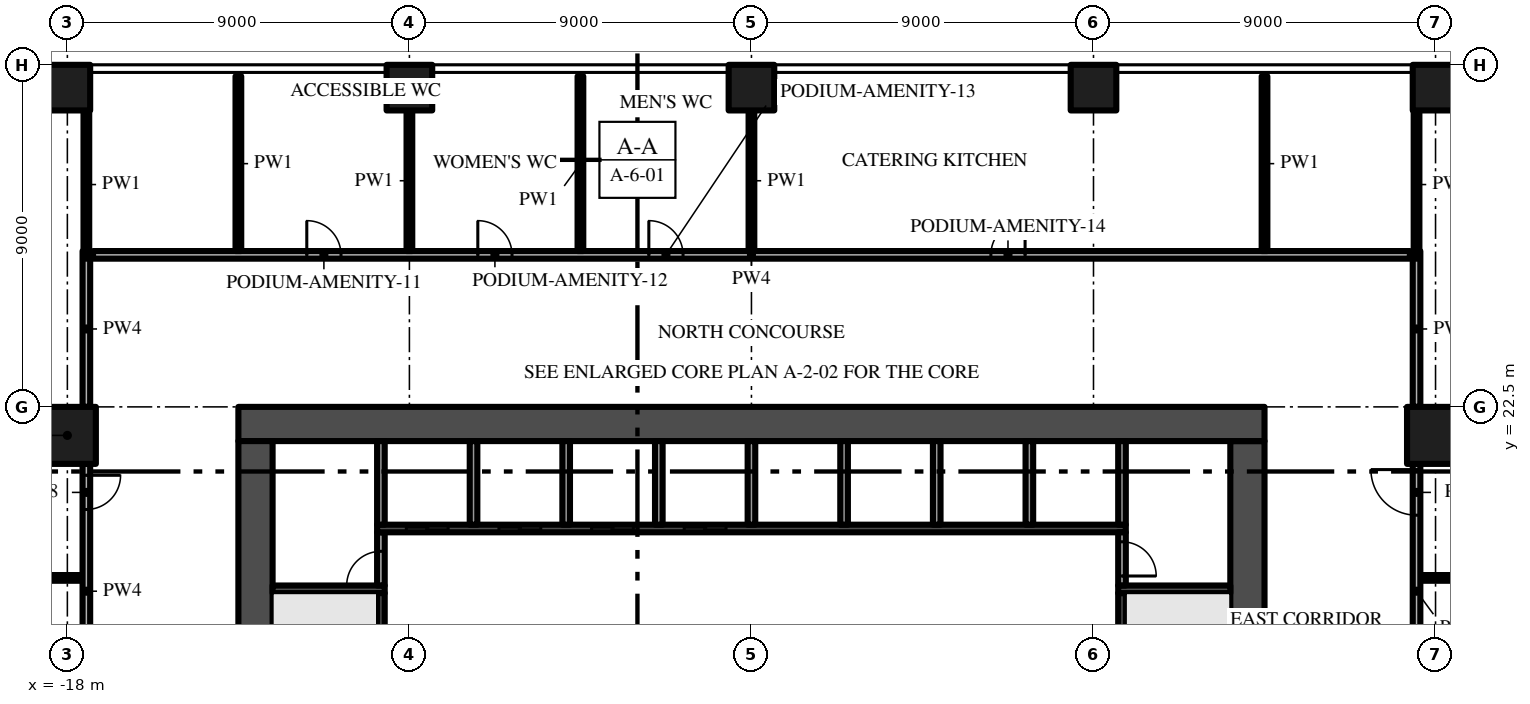
"""IFC4 building model, lengths in metres.
Left out: names, types, materials, properties, quantities, classifications, styles, units other than length and angle.
Written with IfcOpenShell. Run it as: python <this file> out.ifc"""

import sys

from ifc_helpers import new_model, si_unit, direction, frame, frame_2d, origin, origin_2d, place, context, subcontext, project, spatial, rectangle, extrude, element, fill, save


model = new_model("IFC4")
c1 = context("Model", 3, precision=1e-05, world=origin(), true_north=direction((0.0, 1.0)))
c2 = subcontext(c1, "Body", "Model", "MODEL_VIEW")
j1 = project(units=[si_unit("LENGTHUNIT", "METRE"), si_unit("PLANEANGLEUNIT", "RADIAN")], contexts=[c1])
p1 = place(None, origin())
s1 = spatial("IfcSite", under=j1, at=p1, CompositionType="ELEMENT")
p2 = place(p1, origin())
s2 = spatial("IfcBuilding", under=s1, at=p2, CompositionType="ELEMENT")
p3 = place(p2, frame((0.0, 0.0, 6.0)))
s3 = spatial("IfcBuildingStorey", under=s2, at=p3, CompositionType="ELEMENT", Elevation=6.0)
p4 = place(p3, frame((13.05, 5.4, -0.4), z_axis=(0.0, 0.0, 1.0), x_axis=(0.0, 1.0, 0.0)))
e1 = element("IfcWall", 1, at=p4, inside=s3, PredefinedType="SHEAR", context=c2, shape_type="SweptSolid", body=[
    extrude(rectangle(XDim=16.2, YDim=0.9, at=frame_2d((8.1, 0.0))), origin(), (0.0, 0.0, 1.0), 4.55),
])
p5 = place(p4, frame((6.0, 0.0, 0.4)))
e2 = element("IfcOpeningElement", 2, at=p5, cuts=e1, PredefinedType="OPENING", context=c2, shape_type="SweptSolid", body=[
    extrude(rectangle(XDim=1.2, YDim=2.2, at=frame_2d((0.6, 1.1))), frame((0.0, 0.46, 0.0), z_axis=(0.0, -1.0, 0.0), x_axis=(1.0, 0.0, 0.0)), (0.0, 0.0, 1.0), 0.92),
])
p6 = place(p3, frame((13.5, 22.05, -0.4), z_axis=(0.0, 0.0, 1.0), x_axis=(-1.0, 0.0, 0.0)))
e3 = element("IfcWall", 3, at=p6, inside=s3, PredefinedType="SHEAR", context=c2, shape_type="SweptSolid", body=[
    extrude(rectangle(XDim=27.0, YDim=0.9, at=frame_2d((13.5, 0.0))), origin(), (0.0, 0.0, 1.0), 4.55),
])
p7 = place(p3, frame((-13.05, 21.6, -0.4), z_axis=(0.0, 0.0, 1.0), x_axis=(0.0, -1.0, 0.0)))
e4 = element("IfcWall", 4, at=p7, inside=s3, PredefinedType="SHEAR", context=c2, shape_type="SweptSolid", body=[
    extrude(rectangle(XDim=16.2, YDim=0.9, at=frame_2d((8.1, 0.0))), origin(), (0.0, 0.0, 1.0), 4.55),
])
p8 = place(p7, frame((9.0, 0.0, 0.4)))
e5 = element("IfcOpeningElement", 5, at=p8, cuts=e4, PredefinedType="OPENING", context=c2, shape_type="SweptSolid", body=[
    extrude(rectangle(XDim=1.2, YDim=2.2, at=frame_2d((0.6, 1.1))), frame((0.0, 0.46, 0.0), z_axis=(0.0, -1.0, 0.0), x_axis=(1.0, 0.0, 0.0)), (0.0, 0.0, 1.0), 0.92),
])
for number, where, z_axis, x_axis in (
    (6, (-18.0, 30.9, 0.0), (0.0, 0.0, 1.0), (1.0, 0.0, 0.0)),
    (7, (-9.0, 30.9, 0.0), (0.0, 0.0, 1.0), (1.0, 0.0, 0.0)),
    (8, (0.0, 30.9, 0.0), (0.0, 0.0, 1.0), (1.0, 0.0, 0.0)),
    (9, (18.0, 30.9, 0.0), (0.0, 0.0, 1.0), (1.0, 0.0, 0.0)),
    (10, (9.0, 30.9, 0.0), (0.0, 0.0, 1.0), (1.0, 0.0, 0.0)),
):
    element("IfcColumn", number, at=place(p3, frame(where, z_axis=z_axis, x_axis=x_axis)), inside=s3, PredefinedType="COLUMN", context=c2, shape_type="SweptSolid", body=[
        extrude(rectangle(XDim=1.2, YDim=1.2, at=origin_2d()), origin(), (0.0, 0.0, 1.0), 4.15),
    ])
for number, where, z_axis, x_axis in (
    (11, (-18.0, 21.75, 0.0), (0.0, 0.0, 1.0), (1.0, 0.0, 0.0)),
    (12, (18.0, 21.75, 0.0), (0.0, 0.0, 1.0), (1.0, 0.0, 0.0)),
):
    element("IfcColumn", number, at=place(p3, frame(where, z_axis=z_axis, x_axis=x_axis)), inside=s3, PredefinedType="COLUMN", context=c2, shape_type="SweptSolid", body=[
        extrude(rectangle(XDim=1.5, YDim=1.5, at=origin_2d()), origin(), (0.0, 0.0, 1.0), 4.15),
    ])
p9 = place(p3, frame((-12.6, 17.7, 0.0), z_axis=(0.0, 0.0, 1.0), x_axis=(1.0, 0.0, 0.0)))
e13 = element("IfcWall", 13, at=p9, inside=s3, PredefinedType="SHEAR", context=c2, shape_type="SweptSolid", body=[
    extrude(rectangle(XDim=2.95, YDim=0.2, at=frame_2d((1.475, 0.0))), origin(), (0.0, 0.0, 1.0), 4.15),
])
p10 = place(p3, frame((-9.75, 16.1, 0.0), z_axis=(0.0, 0.0, 1.0), x_axis=(0.0, 1.0, 0.0)))
e14 = element("IfcWall", 14, at=p10, inside=s3, PredefinedType="SHEAR", context=c2, shape_type="SweptSolid", body=[
    extrude(rectangle(XDim=1.5, YDim=0.2, at=frame_2d((0.75, 0.0))), origin(), (0.0, 0.0, 1.0), 4.15),
])
p11 = place(p3, frame((-9.75, 17.8, 0.0), z_axis=(0.0, 0.0, 1.0), x_axis=(0.0, 1.0, 0.0)))
e15 = element("IfcWall", 15, at=p11, inside=s3, PredefinedType="PARTITIONING", context=c2, shape_type="SweptSolid", body=[
    extrude(rectangle(XDim=1.4, YDim=0.2, at=frame_2d((0.7, 0.0))), origin(), (0.0, 0.0, 1.0), 4.15),
])
p12 = place(p11, origin())
e16 = element("IfcOpeningElement", 16, at=p12, cuts=e15, PredefinedType="OPENING", context=c2, shape_type="SweptSolid", body=[
    extrude(rectangle(XDim=0.9, YDim=2.1, at=frame_2d((0.45, 1.05))), frame((0.0, 0.11, 0.0), z_axis=(0.0, -1.0, 0.0), x_axis=(1.0, 0.0, 0.0)), (0.0, 0.0, 1.0), 0.22),
])
p13 = place(p3, frame((-9.85, 19.3, 0.0), z_axis=(0.0, 0.0, 1.0), x_axis=(1.0, 0.0, 0.0)))
e17 = element("IfcWall", 17, at=p13, inside=s3, PredefinedType="SHEAR", context=c2, shape_type="SweptSolid", body=[
    extrude(rectangle(XDim=19.7, YDim=0.2, at=frame_2d((9.85, 0.0))), origin(), (0.0, 0.0, 1.0), 4.15),
])
p14 = place(p13, frame((0.769, 0.0, 0.0)))
e18 = element("IfcOpeningElement", 18, at=p14, cuts=e17, PredefinedType="OPENING", context=c2, shape_type="SweptSolid", body=[
    extrude(rectangle(XDim=1.1, YDim=2.1, at=frame_2d((0.55, 1.05))), frame((0.0, 0.11, 0.0), z_axis=(0.0, -1.0, 0.0), x_axis=(1.0, 0.0, 0.0)), (0.0, 0.0, 1.0), 0.22),
])
p15 = place(p13, frame((3.206, 0.0, 0.0)))
e19 = element("IfcOpeningElement", 19, at=p15, cuts=e17, PredefinedType="OPENING", context=c2, shape_type="SweptSolid", body=[
    extrude(rectangle(XDim=1.1, YDim=2.1, at=frame_2d((0.55, 1.05))), frame((0.0, 0.11, 0.0), z_axis=(0.0, -1.0, 0.0), x_axis=(1.0, 0.0, 0.0)), (0.0, 0.0, 1.0), 0.22),
])
p16 = place(p13, frame((5.644, 0.0, 0.0)))
e20 = element("IfcOpeningElement", 20, at=p16, cuts=e17, PredefinedType="OPENING", context=c2, shape_type="SweptSolid", body=[
    extrude(rectangle(XDim=1.1, YDim=2.1, at=frame_2d((0.55, 1.05))), frame((0.0, 0.11, 0.0), z_axis=(0.0, -1.0, 0.0), x_axis=(1.0, 0.0, 0.0)), (0.0, 0.0, 1.0), 0.22),
])
p17 = place(p13, frame((8.081, 0.0, 0.0)))
e21 = element("IfcOpeningElement", 21, at=p17, cuts=e17, PredefinedType="OPENING", context=c2, shape_type="SweptSolid", body=[
    extrude(rectangle(XDim=1.1, YDim=2.1, at=frame_2d((0.55, 1.05))), frame((0.0, 0.11, 0.0), z_axis=(0.0, -1.0, 0.0), x_axis=(1.0, 0.0, 0.0)), (0.0, 0.0, 1.0), 0.22),
])
for number, where, z_axis, x_axis in (
    (22, (-9.75, 19.4, 0.0), (0.0, 0.0, 1.0), (0.0, 1.0, 0.0)),
    (23, (-7.312, 19.4, 0.0), (0.0, 0.0, 1.0), (0.0, 1.0, 0.0)),
    (24, (-4.875, 19.4, 0.0), (0.0, 0.0, 1.0), (0.0, 1.0, 0.0)),
    (25, (-2.438, 19.4, 0.0), (0.0, 0.0, 1.0), (0.0, 1.0, 0.0)),
    (26, (0.0, 19.4, 0.0), (0.0, 0.0, 1.0), (0.0, 1.0, 0.0)),
    (27, (2.438, 19.4, 0.0), (0.0, 0.0, 1.0), (0.0, 1.0, 0.0)),
    (28, (4.875, 19.4, 0.0), (0.0, 0.0, 1.0), (0.0, 1.0, 0.0)),
    (29, (7.312, 19.4, 0.0), (0.0, 0.0, 1.0), (0.0, 1.0, 0.0)),
):
    element("IfcWall", number, at=place(p3, frame(where, z_axis=z_axis, x_axis=x_axis)), inside=s3, PredefinedType="PARTITIONING", context=c2, shape_type="SweptSolid", body=[
        extrude(rectangle(XDim=2.2, YDim=0.2, at=frame_2d((1.1, 0.0))), origin(), (0.0, 0.0, 1.0), 4.15),
    ])
p18 = place(p3, frame((9.75, 16.1, 0.0), z_axis=(0.0, 0.0, 1.0), x_axis=(0.0, 1.0, 0.0)))
e30 = element("IfcWall", 30, at=p18, inside=s3, PredefinedType="SHEAR", context=c2, shape_type="SweptSolid", body=[
    extrude(rectangle(XDim=1.5, YDim=0.2, at=frame_2d((0.75, 0.0))), origin(), (0.0, 0.0, 1.0), 4.15),
])
p19 = place(p3, frame((9.65, 17.7, 0.0), z_axis=(0.0, 0.0, 1.0), x_axis=(1.0, 0.0, 0.0)))
e31 = element("IfcWall", 31, at=p19, inside=s3, PredefinedType="SHEAR", context=c2, shape_type="SweptSolid", body=[
    extrude(rectangle(XDim=2.95, YDim=0.2, at=frame_2d((1.475, 0.0))), origin(), (0.0, 0.0, 1.0), 4.15),
])
p20 = place(p3, frame((9.75, 19.2, 0.0), z_axis=(0.0, 0.0, 1.0), x_axis=(0.0, -1.0, 0.0)))
e32 = element("IfcWall", 32, at=p20, inside=s3, PredefinedType="PARTITIONING", context=c2, shape_type="SweptSolid", body=[
    extrude(rectangle(XDim=1.4, YDim=0.2, at=frame_2d((0.7, 0.0))), origin(), (0.0, 0.0, 1.0), 4.15),
])
p21 = place(p20, frame((0.25, 0.0, 0.0)))
e33 = element("IfcOpeningElement", 33, at=p21, cuts=e32, PredefinedType="OPENING", context=c2, shape_type="SweptSolid", body=[
    extrude(rectangle(XDim=0.9, YDim=2.1, at=frame_2d((0.45, 1.05))), frame((0.0, 0.11, 0.0), z_axis=(0.0, -1.0, 0.0), x_axis=(1.0, 0.0, 0.0)), (0.0, 0.0, 1.0), 0.22),
])
p22 = place(p3, frame((9.75, 19.4, 0.0), z_axis=(0.0, 0.0, 1.0), x_axis=(0.0, 1.0, 0.0)))
e34 = element("IfcWall", 34, at=p22, inside=s3, PredefinedType="PARTITIONING", context=c2, shape_type="SweptSolid", body=[
    extrude(rectangle(XDim=2.2, YDim=0.2, at=frame_2d((1.1, 0.0))), origin(), (0.0, 0.0, 1.0), 4.15),
])
for number, where, z_axis, x_axis in (
    (35, (-21.75, 18.0, 0.0), (0.0, 0.0, 1.0), (1.0, 0.0, 0.0)),
    (36, (17.6, 18.0, 0.0), (0.0, 0.0, 1.0), (1.0, 0.0, 0.0)),
):
    element("IfcWall", number, at=place(p3, frame(where, z_axis=z_axis, x_axis=x_axis)), inside=s3, PredefinedType="PARTITIONING", context=c2, shape_type="SweptSolid", body=[
        extrude(rectangle(XDim=4.15, YDim=0.15, at=frame_2d((2.075, 0.0))), origin(), (0.0, 0.0, 1.0), 4.15),
    ])
p23 = place(p3, frame((-17.325, 26.5, 0.0), z_axis=(0.0, 0.0, 1.0), x_axis=(1.0, 0.0, 0.0)))
e37 = element("IfcWall", 37, at=p23, inside=s3, PredefinedType="PARTITIONING", context=c2, shape_type="SweptSolid", body=[
    extrude(rectangle(XDim=34.65, YDim=0.2, at=frame_2d((17.325, 0.0))), origin(), (0.0, 0.0, 1.0), 4.15),
])
p24 = place(p23, frame((5.625, 0.0, 0.0)))
e38 = element("IfcOpeningElement", 38, at=p24, cuts=e37, PredefinedType="OPENING", context=c2, shape_type="SweptSolid", body=[
    extrude(rectangle(XDim=0.9, YDim=2.1, at=frame_2d((0.45, 1.05))), frame((0.0, 0.11, 0.0), z_axis=(0.0, -1.0, 0.0), x_axis=(1.0, 0.0, 0.0)), (0.0, 0.0, 1.0), 0.22),
])
p25 = place(p23, frame((10.125, 0.0, 0.0)))
e39 = element("IfcOpeningElement", 39, at=p25, cuts=e37, PredefinedType="OPENING", context=c2, shape_type="SweptSolid", body=[
    extrude(rectangle(XDim=0.9, YDim=2.1, at=frame_2d((0.45, 1.05))), frame((0.0, 0.11, 0.0), z_axis=(0.0, -1.0, 0.0), x_axis=(1.0, 0.0, 0.0)), (0.0, 0.0, 1.0), 0.22),
])
p26 = place(p23, frame((14.625, 0.0, 0.0)))
e40 = element("IfcOpeningElement", 40, at=p26, cuts=e37, PredefinedType="OPENING", context=c2, shape_type="SweptSolid", body=[
    extrude(rectangle(XDim=0.9, YDim=2.1, at=frame_2d((0.45, 1.05))), frame((0.0, 0.11, 0.0), z_axis=(0.0, -1.0, 0.0), x_axis=(1.0, 0.0, 0.0)), (0.0, 0.0, 1.0), 0.22),
])
p27 = place(p23, frame((23.625, 0.0, 0.0)))
e41 = element("IfcOpeningElement", 41, at=p27, cuts=e37, PredefinedType="OPENING", context=c2, shape_type="SweptSolid", body=[
    extrude(rectangle(XDim=0.9, YDim=2.1, at=frame_2d((0.45, 1.05))), frame((0.0, 0.11, 0.0), z_axis=(0.0, -1.0, 0.0), x_axis=(1.0, 0.0, 0.0)), (0.0, 0.0, 1.0), 0.22),
])
p28 = place(p3, frame((-17.5, 21.0, 0.0), z_axis=(0.0, 0.0, 1.0), x_axis=(0.0, -1.0, 0.0)))
e42 = element("IfcWall", 42, at=p28, inside=s3, PredefinedType="PARTITIONING", context=c2, shape_type="SweptSolid", body=[
    extrude(rectangle(XDim=6.7, YDim=0.2, at=frame_2d((3.35, 0.0))), origin(), (0.0, 0.0, 1.0), 4.15),
])
p29 = place(p28, frame((0.3, 0.0, 0.0)))
e43 = element("IfcOpeningElement", 43, at=p29, cuts=e42, PredefinedType="OPENING", context=c2, shape_type="SweptSolid", body=[
    extrude(rectangle(XDim=0.9, YDim=2.1, at=frame_2d((0.45, 1.05))), frame((0.0, 0.11, 0.0), z_axis=(0.0, -1.0, 0.0), x_axis=(1.0, 0.0, 0.0)), (0.0, 0.0, 1.0), 0.22),
])
p30 = place(p3, frame((-17.5, 22.5, 0.0), z_axis=(0.0, 0.0, 1.0), x_axis=(0.0, 1.0, 0.0)))
e44 = element("IfcWall", 44, at=p30, inside=s3, PredefinedType="PARTITIONING", context=c2, shape_type="SweptSolid", body=[
    extrude(rectangle(XDim=4.1, YDim=0.2, at=frame_2d((2.05, 0.0))), origin(), (0.0, 0.0, 1.0), 4.15),
])
p31 = place(p3, frame((-17.5, 26.4, 0.0), z_axis=(0.0, 0.0, 1.0), x_axis=(0.0, 1.0, 0.0)))
e45 = element("IfcWall", 45, at=p31, inside=s3, PredefinedType="PARTITIONING", context=c2, shape_type="SweptSolid", body=[
    extrude(rectangle(XDim=3.9, YDim=0.15, at=frame_2d((1.95, 0.0))), origin(), (0.0, 0.0, 1.0), 4.15),
])
p32 = place(p3, frame((-13.5, 26.6, 0.0), z_axis=(0.0, 0.0, 1.0), x_axis=(0.0, 1.0, 0.0)))
e46 = element("IfcWall", 46, at=p32, inside=s3, PredefinedType="PARTITIONING", context=c2, shape_type="SweptSolid", body=[
    extrude(rectangle(XDim=4.6, YDim=0.15, at=frame_2d((2.3, 0.0))), origin(), (0.0, 0.0, 1.0), 4.15),
])
p33 = place(p3, frame((-9.0, 26.6, 0.0), z_axis=(0.0, 0.0, 1.0), x_axis=(0.0, 1.0, 0.0)))
e47 = element("IfcWall", 47, at=p33, inside=s3, PredefinedType="PARTITIONING", context=c2, shape_type="SweptSolid", body=[
    extrude(rectangle(XDim=3.7, YDim=0.15, at=frame_2d((1.85, 0.0))), origin(), (0.0, 0.0, 1.0), 4.15),
])
p34 = place(p3, frame((-4.5, 26.6, 0.0), z_axis=(0.0, 0.0, 1.0), x_axis=(0.0, 1.0, 0.0)))
e48 = element("IfcWall", 48, at=p34, inside=s3, PredefinedType="PARTITIONING", context=c2, shape_type="SweptSolid", body=[
    extrude(rectangle(XDim=4.6, YDim=0.15, at=frame_2d((2.3, 0.0))), origin(), (0.0, 0.0, 1.0), 4.15),
])
p35 = place(p3, frame((0.0, 26.6, 0.0), z_axis=(0.0, 0.0, 1.0), x_axis=(0.0, 1.0, 0.0)))
e49 = element("IfcWall", 49, at=p35, inside=s3, PredefinedType="PARTITIONING", context=c2, shape_type="SweptSolid", body=[
    extrude(rectangle(XDim=3.7, YDim=0.15, at=frame_2d((1.85, 0.0))), origin(), (0.0, 0.0, 1.0), 4.15),
])
p36 = place(p3, frame((13.5, 26.6, 0.0), z_axis=(0.0, 0.0, 1.0), x_axis=(0.0, 1.0, 0.0)))
e50 = element("IfcWall", 50, at=p36, inside=s3, PredefinedType="PARTITIONING", context=c2, shape_type="SweptSolid", body=[
    extrude(rectangle(XDim=4.6, YDim=0.15, at=frame_2d((2.3, 0.0))), origin(), (0.0, 0.0, 1.0), 4.15),
])
p37 = place(p3, frame((17.5, 14.3, 0.0), z_axis=(0.0, 0.0, 1.0), x_axis=(0.0, 1.0, 0.0)))
e51 = element("IfcWall", 51, at=p37, inside=s3, PredefinedType="PARTITIONING", context=c2, shape_type="SweptSolid", body=[
    extrude(rectangle(XDim=6.7, YDim=0.2, at=frame_2d((3.35, 0.0))), origin(), (0.0, 0.0, 1.0), 4.15),
])
p38 = place(p37, frame((5.35, 0.0, 0.0)))
e52 = element("IfcOpeningElement", 52, at=p38, cuts=e51, PredefinedType="OPENING", context=c2, shape_type="SweptSolid", body=[
    extrude(rectangle(XDim=1.2, YDim=2.4, at=frame_2d((0.6, 1.2))), frame((0.0, 0.11, 0.0), z_axis=(0.0, -1.0, 0.0), x_axis=(1.0, 0.0, 0.0)), (0.0, 0.0, 1.0), 0.22),
])
p39 = place(p3, frame((17.5, 22.5, 0.0), z_axis=(0.0, 0.0, 1.0), x_axis=(0.0, 1.0, 0.0)))
e53 = element("IfcWall", 53, at=p39, inside=s3, PredefinedType="PARTITIONING", context=c2, shape_type="SweptSolid", body=[
    extrude(rectangle(XDim=4.1, YDim=0.2, at=frame_2d((2.05, 0.0))), origin(), (0.0, 0.0, 1.0), 4.15),
])
p40 = place(p3, frame((17.5, 26.4, 0.0), z_axis=(0.0, 0.0, 1.0), x_axis=(0.0, 1.0, 0.0)))
e54 = element("IfcWall", 54, at=p40, inside=s3, PredefinedType="PARTITIONING", context=c2, shape_type="SweptSolid", body=[
    extrude(rectangle(XDim=3.9, YDim=0.15, at=frame_2d((1.95, 0.0))), origin(), (0.0, 0.0, 1.0), 4.15),
])
p41 = place(p14, origin())
e55 = element("IfcDoor", 55, at=p41, inside=s3, OperationType="SLIDING_TO_LEFT", PredefinedType="DOOR", context=c2, shape_type="SweptSolid", body=[
    extrude(rectangle(XDim=1.1, YDim=2.1, at=frame_2d((0.55, 1.05))), frame((0.0, 0.025, 0.0), z_axis=(0.0, -1.0, 0.0), x_axis=(1.0, 0.0, 0.0)), (0.0, 0.0, 1.0), 0.05),
])
fill(e18, e55)
p42 = place(p15, origin())
e56 = element("IfcDoor", 56, at=p42, inside=s3, OperationType="SLIDING_TO_LEFT", PredefinedType="DOOR", context=c2, shape_type="SweptSolid", body=[
    extrude(rectangle(XDim=1.1, YDim=2.1, at=frame_2d((0.55, 1.05))), frame((0.0, 0.025, 0.0), z_axis=(0.0, -1.0, 0.0), x_axis=(1.0, 0.0, 0.0)), (0.0, 0.0, 1.0), 0.05),
])
fill(e19, e56)
p43 = place(p16, origin())
e57 = element("IfcDoor", 57, at=p43, inside=s3, OperationType="SLIDING_TO_LEFT", PredefinedType="DOOR", context=c2, shape_type="SweptSolid", body=[
    extrude(rectangle(XDim=1.1, YDim=2.1, at=frame_2d((0.55, 1.05))), frame((0.0, 0.025, 0.0), z_axis=(0.0, -1.0, 0.0), x_axis=(1.0, 0.0, 0.0)), (0.0, 0.0, 1.0), 0.05),
])
fill(e20, e57)
p44 = place(p17, origin())
e58 = element("IfcDoor", 58, at=p44, inside=s3, OperationType="SLIDING_TO_LEFT", PredefinedType="DOOR", context=c2, shape_type="SweptSolid", body=[
    extrude(rectangle(XDim=1.1, YDim=2.1, at=frame_2d((0.55, 1.05))), frame((0.0, 0.025, 0.0), z_axis=(0.0, -1.0, 0.0), x_axis=(1.0, 0.0, 0.0)), (0.0, 0.0, 1.0), 0.05),
])
fill(e21, e58)
p45 = place(p12, origin())
e59 = element("IfcDoor", 59, at=p45, inside=s3, OperationType="SINGLE_SWING_LEFT", PredefinedType="DOOR", context=c2, shape_type="SweptSolid", body=[
    extrude(rectangle(XDim=0.9, YDim=2.1, at=frame_2d((0.45, 1.05))), frame((0.0, 0.025, 0.0), z_axis=(0.0, -1.0, 0.0), x_axis=(1.0, 0.0, 0.0)), (0.0, 0.0, 1.0), 0.05),
])
fill(e16, e59)
p46 = place(p21, origin())
e60 = element("IfcDoor", 60, at=p46, inside=s3, OperationType="SINGLE_SWING_RIGHT", PredefinedType="DOOR", context=c2, shape_type="SweptSolid", body=[
    extrude(rectangle(XDim=0.9, YDim=2.1, at=frame_2d((0.45, 1.05))), frame((0.0, 0.025, 0.0), z_axis=(0.0, -1.0, 0.0), x_axis=(1.0, 0.0, 0.0)), (0.0, 0.0, 1.0), 0.05),
])
fill(e33, e60)
p47 = place(p29, origin())
e61 = element("IfcDoor", 61, at=p47, inside=s3, OperationType="SINGLE_SWING_LEFT", PredefinedType="DOOR", context=c2, shape_type="SweptSolid", body=[
    extrude(rectangle(XDim=0.9, YDim=2.1, at=frame_2d((0.45, 1.05))), frame((0.0, 0.025, 0.0), z_axis=(0.0, -1.0, 0.0), x_axis=(1.0, 0.0, 0.0)), (0.0, 0.0, 1.0), 0.05),
])
fill(e43, e61)
p48 = place(p38, origin())
e62 = element("IfcDoor", 62, at=p48, inside=s3, OperationType="SINGLE_SWING_RIGHT", PredefinedType="DOOR", context=c2, shape_type="SweptSolid", body=[
    extrude(rectangle(XDim=1.2, YDim=2.4, at=frame_2d((0.6, 1.2))), frame((0.0, 0.025, 0.0), z_axis=(0.0, -1.0, 0.0), x_axis=(1.0, 0.0, 0.0)), (0.0, 0.0, 1.0), 0.05),
])
fill(e52, e62)
p49 = place(p24, origin())
e63 = element("IfcDoor", 63, at=p49, inside=s3, OperationType="SINGLE_SWING_LEFT", PredefinedType="DOOR", context=c2, shape_type="SweptSolid", body=[
    extrude(rectangle(XDim=0.9, YDim=2.1, at=frame_2d((0.45, 1.05))), frame((0.0, 0.025, 0.0), z_axis=(0.0, -1.0, 0.0), x_axis=(1.0, 0.0, 0.0)), (0.0, 0.0, 1.0), 0.05),
])
fill(e38, e63)
p50 = place(p25, origin())
e64 = element("IfcDoor", 64, at=p50, inside=s3, OperationType="SINGLE_SWING_LEFT", PredefinedType="DOOR", context=c2, shape_type="SweptSolid", body=[
    extrude(rectangle(XDim=0.9, YDim=2.1, at=frame_2d((0.45, 1.05))), frame((0.0, 0.025, 0.0), z_axis=(0.0, -1.0, 0.0), x_axis=(1.0, 0.0, 0.0)), (0.0, 0.0, 1.0), 0.05),
])
fill(e39, e64)
p51 = place(p26, origin())
e65 = element("IfcDoor", 65, at=p51, inside=s3, OperationType="SINGLE_SWING_LEFT", PredefinedType="DOOR", context=c2, shape_type="SweptSolid", body=[
    extrude(rectangle(XDim=0.9, YDim=2.1, at=frame_2d((0.45, 1.05))), frame((0.0, 0.025, 0.0), z_axis=(0.0, -1.0, 0.0), x_axis=(1.0, 0.0, 0.0)), (0.0, 0.0, 1.0), 0.05),
])
fill(e40, e65)
p52 = place(p27, origin())
e66 = element("IfcDoor", 66, at=p52, inside=s3, OperationType="SINGLE_SWING_RIGHT", PredefinedType="DOOR", context=c2, shape_type="SweptSolid", body=[
    extrude(rectangle(XDim=0.9, YDim=2.1, at=frame_2d((0.45, 1.05))), frame((0.0, 0.025, 0.0), z_axis=(0.0, -1.0, 0.0), x_axis=(1.0, 0.0, 0.0)), (0.0, 0.0, 1.0), 0.05),
])
fill(e41, e66)
save(model, sys.argv[1])
